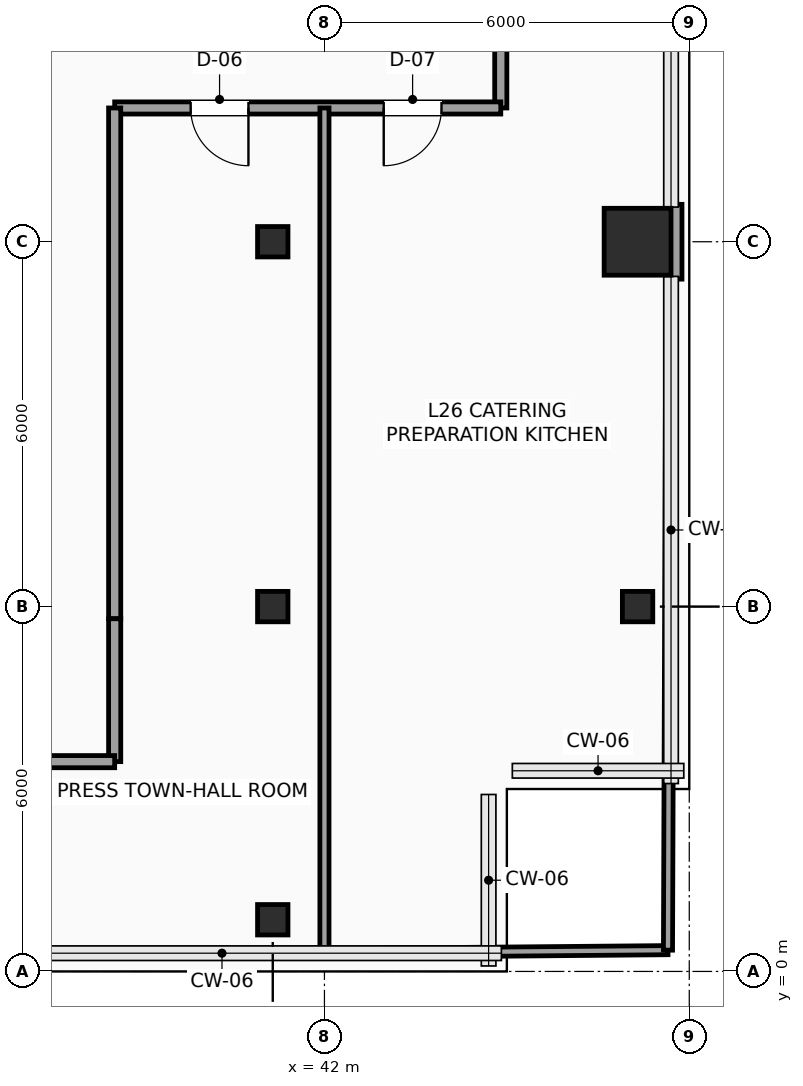
"""IFC4 building model, lengths in metres.
Left out: names, types, materials, properties, quantities, classifications, styles, units other than length and angle.
Written with IfcOpenShell. Run it as: python <this file> out.ifc"""

import sys

from ifc_helpers import new_model, si_unit, direction, frame, frame_2d, origin, origin_2d, place, context, subcontext, project, spatial, rectangle, hollow_rectangle, extrude, element, fill, save


model = new_model("IFC4")
c1 = context("Model", 3, precision=1e-05, world=origin(), true_north=direction((0.0, 1.0)))
c2 = subcontext(c1, "Body", "Model", "MODEL_VIEW")
j1 = project(units=[si_unit("LENGTHUNIT", "METRE"), si_unit("PLANEANGLEUNIT", "RADIAN")], contexts=[c1])
p1 = place(None, origin())
s1 = spatial("IfcSite", under=j1, at=p1, CompositionType="ELEMENT")
p2 = place(p1, origin())
s2 = spatial("IfcBuilding", under=s1, at=p2, CompositionType="ELEMENT")
p3 = place(p2, frame((0.0, 0.0, 110.85)))
s3 = spatial("IfcBuildingStorey", under=s2, at=p3, CompositionType="ELEMENT", Elevation=110.85)
for number, where, z_axis, x_axis in (
    (1, (41.15, 0.85, 0.0), (0.0, 0.0, 1.0), (1.0, 0.0, 0.0)),
    (2, (41.15, 6.0, 0.0), (0.0, 0.0, 1.0), (1.0, 0.0, 0.0)),
    (3, (41.15, 12.0, 0.0), (0.0, 0.0, 1.0), (1.0, 0.0, 0.0)),
    (4, (47.15, 6.0, 0.0), (0.0, 0.0, 1.0), (1.0, 0.0, 0.0)),
):
    element("IfcColumn", number, at=place(p3, frame(where, z_axis=z_axis, x_axis=x_axis)), inside=s3, PredefinedType="COLUMN", context=c2, shape_type="SweptSolid", body=[
        extrude(hollow_rectangle(XDim=0.5, YDim=0.5, WallThickness=0.025, InnerFilletRadius=0.025, OuterFilletRadius=0.04, at=origin_2d()), origin(), (0.0, 0.0, 1.0), 4.8),
    ])
p4 = place(p3, frame((47.15, 12.0, 0.0), z_axis=(0.0, 0.0, 1.0), x_axis=(1.0, 0.0, 0.0)))
e5 = element("IfcColumn", 5, at=p4, inside=s3, PredefinedType="COLUMN", context=c2, shape_type="SweptSolid", body=[
    extrude(rectangle(XDim=1.1, YDim=1.1, at=origin_2d()), origin(), (0.0, 0.0, 1.0), 4.8),
])
p5 = place(p3, frame((47.76, 12.615, 0.0), z_axis=(0.0, 0.0, 1.0), x_axis=(0.0, -1.0, 0.0)))
e6 = element("IfcWall", 6, at=p5, inside=s3, PredefinedType="SOLIDWALL", context=c2, shape_type="SweptSolid", body=[
    extrude(rectangle(XDim=1.23, YDim=0.24, at=frame_2d((0.615, 0.0))), origin(), (0.0, 0.0, 1.0), 4.575),
])
p6 = place(p3, frame((44.9, 16.55, 0.0), z_axis=(0.0, 0.0, 1.0), x_axis=(0.0, -1.0, 0.0)))
e7 = element("IfcWall", 7, at=p6, inside=s3, PredefinedType="PARTITIONING", context=c2, shape_type="SweptSolid", body=[
    extrude(rectangle(XDim=2.35, YDim=0.2, at=frame_2d((1.175, 0.0))), origin(), (0.0, 0.0, 1.0), 4.575),
])
p7 = place(p3, frame((44.9, 14.2, 0.0), z_axis=(0.0, 0.0, 1.0), x_axis=(-1.0, 0.0, 0.0)))
e8 = element("IfcWall", 8, at=p7, inside=s3, PredefinedType="PARTITIONING", context=c2, shape_type="SweptSolid", body=[
    extrude(rectangle(XDim=6.35, YDim=0.2, at=frame_2d((3.175, 0.0))), origin(), (0.0, 0.0, 1.0), 4.575),
])
p8 = place(p7, frame((4.15, 0.0, 0.0)))
e9 = element("IfcOpeningElement", 9, at=p8, cuts=e8, PredefinedType="OPENING", context=c2, shape_type="SweptSolid", body=[
    extrude(rectangle(XDim=0.95, YDim=2.15, at=frame_2d((0.475, 1.075))), frame((0.0, 0.11, 0.0), z_axis=(0.0, -1.0, 0.0), x_axis=(1.0, 0.0, 0.0)), (0.0, 0.0, 1.0), 0.22),
])
p9 = place(p7, frame((0.975, 0.0, 0.0)))
e10 = element("IfcOpeningElement", 10, at=p9, cuts=e8, PredefinedType="OPENING", context=c2, shape_type="SweptSolid", body=[
    extrude(rectangle(XDim=0.95, YDim=2.15, at=frame_2d((0.475, 1.075))), frame((0.0, 0.11, 0.0), z_axis=(0.0, -1.0, 0.0), x_axis=(1.0, 0.0, 0.0)), (0.0, 0.0, 1.0), 0.22),
])
p10 = place(p3, frame((38.55, 14.2, 0.0), z_axis=(0.0, 0.0, 1.0), x_axis=(0.0, -1.0, 0.0)))
e11 = element("IfcWall", 11, at=p10, inside=s3, PredefinedType="PARTITIONING", context=c2, shape_type="SweptSolid", body=[
    extrude(rectangle(XDim=8.4, YDim=0.2, at=frame_2d((4.2, 0.0))), origin(), (0.0, 0.0, 1.0), 4.575),
])
p11 = place(p3, frame((38.55, 5.8, 0.0), z_axis=(0.0, 0.0, 1.0), x_axis=(0.0, -1.0, 0.0)))
e12 = element("IfcWall", 12, at=p11, inside=s3, PredefinedType="PARTITIONING", context=c2, shape_type="SweptSolid", body=[
    extrude(rectangle(XDim=2.35, YDim=0.2, at=frame_2d((1.175, 0.0))), origin(), (0.0, 0.0, 1.0), 4.575),
])
p12 = place(p3, frame((38.55, 3.45, 0.0), z_axis=(0.0, 0.0, 1.0), x_axis=(-1.0, 0.0, 0.0)))
e13 = element("IfcWall", 13, at=p12, inside=s3, PredefinedType="PARTITIONING", context=c2, shape_type="SweptSolid", body=[
    extrude(rectangle(XDim=2.4, YDim=0.2, at=frame_2d((1.2, 0.0))), origin(), (0.0, 0.0, 1.0), 4.117),
])
p13 = place(p3, frame((42.0, 0.3, 0.0), z_axis=(0.0, 0.0, 1.0), x_axis=(0.0, 1.0, 0.0)))
e14 = element("IfcWall", 14, at=p13, inside=s3, PredefinedType="PARTITIONING", context=c2, shape_type="SweptSolid", body=[
    extrude(rectangle(XDim=13.9, YDim=0.15, at=frame_2d((6.95, 0.0))), origin(), (0.0, 0.0, 1.0), 4.575),
])
p14 = place(p3, frame((42.0, 0.3, 0.0), z_axis=(0.0, 0.0, 1.0), x_axis=(0.999960767102, 0.00885800524, 0.0)))
e15 = element("IfcWall", 15, at=p14, inside=s3, PredefinedType="PARTITIONING", context=c2, shape_type="SweptSolid", body=[
    extrude(rectangle(XDim=5.65, YDim=0.15, at=frame_2d((2.825, 0.0))), origin(), (0.0, 0.0, 1.0), 4.575),
])
p15 = place(p3, frame((47.65, 0.35, 0.0), z_axis=(0.0, 0.0, 1.0), x_axis=(0.003606251025, 0.999993497456, 0.0)))
e16 = element("IfcWall", 16, at=p15, inside=s3, PredefinedType="PARTITIONING", context=c2, shape_type="SweptSolid", body=[
    extrude(rectangle(XDim=11.035, YDim=0.15, at=frame_2d((5.518, 0.0))), origin(), (0.0, 0.0, 1.0), 4.575),
])
p16 = place(p3, frame((47.694, 12.615, 0.0), z_axis=(0.0, 0.0, 1.0), x_axis=(0.003542799701, 0.999993724265, 0.0)))
e17 = element("IfcWall", 17, at=p16, inside=s3, PredefinedType="PARTITIONING", context=c2, shape_type="SweptSolid", body=[
    extrude(rectangle(XDim=1.585, YDim=0.15, at=frame_2d((0.792, 0.0))), origin(), (0.0, 0.0, 1.0), 4.575),
])
p17 = place(p8, origin())
e18 = element("IfcDoor", 18, at=p17, inside=s3, OperationType="SINGLE_SWING_LEFT", PredefinedType="DOOR", context=c2, shape_type="SweptSolid", body=[
    extrude(rectangle(XDim=0.95, YDim=2.15, at=frame_2d((0.475, 1.075))), frame((0.0, 0.025, 0.0), z_axis=(0.0, -1.0, 0.0), x_axis=(1.0, 0.0, 0.0)), (0.0, 0.0, 1.0), 0.05),
])
fill(e9, e18)
p18 = place(p9, origin())
e19 = element("IfcDoor", 19, at=p18, inside=s3, OperationType="SINGLE_SWING_RIGHT", PredefinedType="DOOR", context=c2, shape_type="SweptSolid", body=[
    extrude(rectangle(XDim=0.95, YDim=2.15, at=frame_2d((0.475, 1.075))), frame((0.0, 0.025, 0.0), z_axis=(0.0, -1.0, 0.0), x_axis=(1.0, 0.0, 0.0)), (0.0, 0.0, 1.0), 0.05),
])
fill(e10, e19)
save(model, sys.argv[1])
